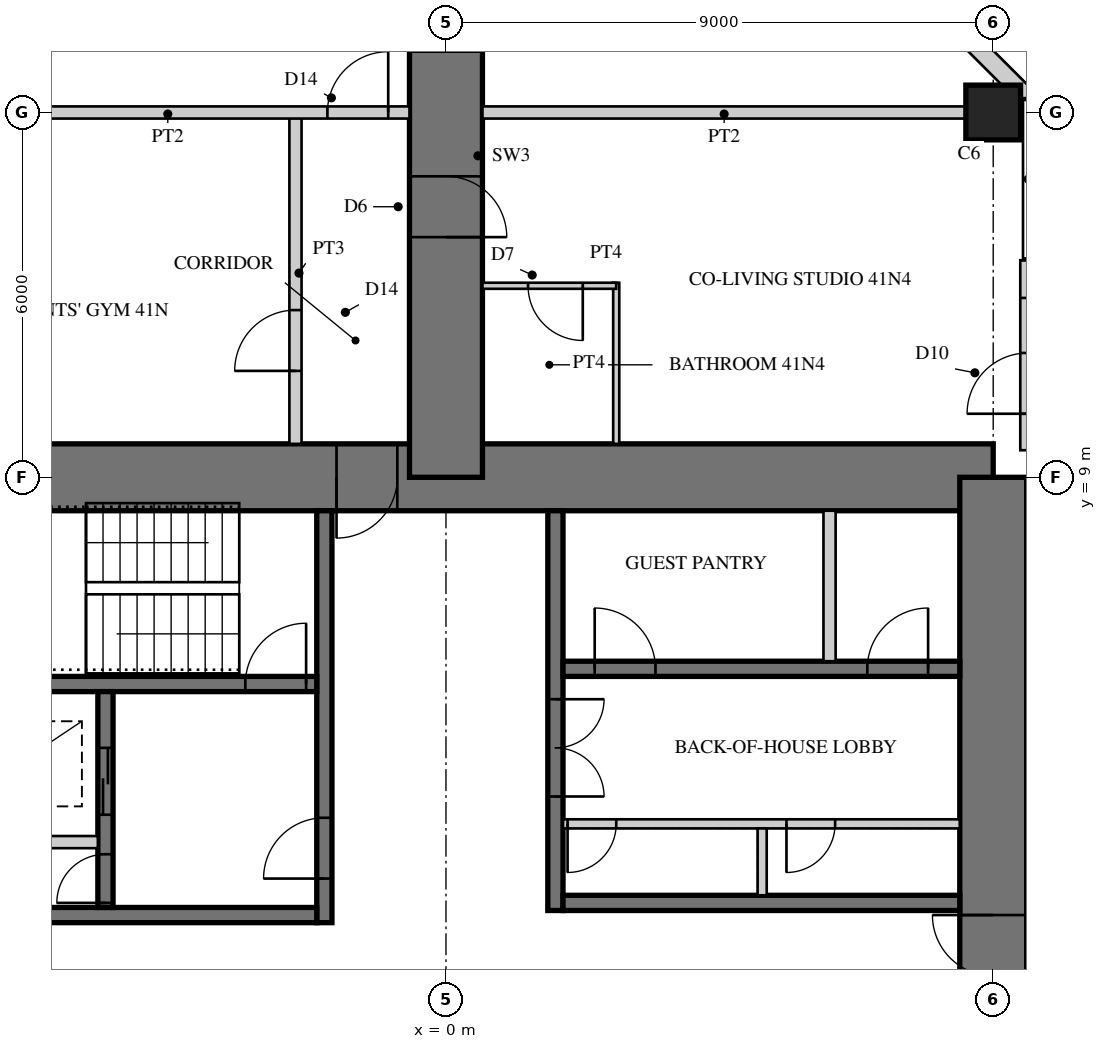
"""IFC4 building model, lengths in metres.
Left out: names, types, materials, properties, quantities, classifications, styles, units other than length and angle.
Written with IfcOpenShell. Run it as: python <this file> out.ifc"""

import sys

from ifc_helpers import new_model, si_unit, direction, frame, frame_2d, origin, origin_2d, place, context, subcontext, project, spatial, rectangle, hollow_rectangle, extrude, element, fill, save


model = new_model("IFC4")
c1 = context("Model", 3, precision=1e-05, world=origin(), true_north=direction((0.0, 1.0)))
c2 = subcontext(c1, "Body", "Model", "MODEL_VIEW")
j1 = project(units=[si_unit("LENGTHUNIT", "METRE"), si_unit("PLANEANGLEUNIT", "RADIAN")], contexts=[c1])
p1 = place(None, origin())
s1 = spatial("IfcSite", under=j1, at=p1, CompositionType="ELEMENT")
p2 = place(p1, origin())
s2 = spatial("IfcBuilding", under=s1, at=p2, CompositionType="ELEMENT")
p3 = place(p2, frame((0.0, 0.0, 169.5)))
s3 = spatial("IfcBuildingStorey", under=s2, at=p3, CompositionType="ELEMENT", Elevation=169.5)
p4 = place(p3, frame((9.0, 9.0, 0.0), z_axis=(0.0, 0.0, 1.0), x_axis=(-1.0, 0.0, 0.0)))
e1 = element("IfcWall", 1, at=p4, inside=s3, PredefinedType="SHEAR", context=c2, shape_type="SweptSolid", body=[
    extrude(rectangle(XDim=18.0, YDim=1.1, at=frame_2d((9.0, 0.0))), origin(), (0.0, 0.0, 1.0), 3.4),
])
p5 = place(p4, frame((9.8, 0.0, 0.0)))
e2 = element("IfcOpeningElement", 2, at=p5, cuts=e1, PredefinedType="OPENING", context=c2, shape_type="SweptSolid", body=[
    extrude(rectangle(XDim=1.0, YDim=2.4, at=frame_2d((0.5, 1.2))), frame((0.0, 0.56, 0.0), z_axis=(0.0, -1.0, 0.0), x_axis=(1.0, 0.0, 0.0)), (0.0, 0.0, 1.0), 1.12),
])
p6 = place(p3, frame((9.0, -9.0, 0.0), z_axis=(0.0, 0.0, 1.0), x_axis=(0.0, 1.0, 0.0)))
e3 = element("IfcWall", 3, at=p6, inside=s3, PredefinedType="SHEAR", context=c2, shape_type="SweptSolid", body=[
    extrude(rectangle(XDim=18.0, YDim=1.1, at=frame_2d((9.0, 0.0))), origin(), (0.0, 0.0, 1.0), 3.4),
])
p7 = place(p6, frame((9.8, 0.0, 0.0)))
e4 = element("IfcOpeningElement", 4, at=p7, cuts=e3, PredefinedType="OPENING", context=c2, shape_type="SweptSolid", body=[
    extrude(rectangle(XDim=1.0, YDim=2.4, at=frame_2d((0.5, 1.2))), frame((0.0, 0.56, 0.0), z_axis=(0.0, -1.0, 0.0), x_axis=(1.0, 0.0, 0.0)), (0.0, 0.0, 1.0), 1.12),
])
p8 = place(p3, frame((1.8, 1.875, 0.0), z_axis=(0.0, 0.0, 1.0), x_axis=(0.0, 1.0, 0.0)))
e5 = element("IfcWall", 5, at=p8, inside=s3, PredefinedType="SHEAR", context=c2, shape_type="SweptSolid", body=[
    extrude(rectangle(XDim=6.575, YDim=0.25, at=frame_2d((3.288, 0.0))), origin(), (0.0, 0.0, 1.0), 3.4),
])
p9 = place(p8, frame((1.875, 0.0, 0.0)))
e6 = element("IfcOpeningElement", 6, at=p9, cuts=e5, PredefinedType="OPENING", context=c2, shape_type="SweptSolid", body=[
    extrude(rectangle(XDim=1.6, YDim=2.4, at=frame_2d((0.8, 1.2))), frame((0.0, 0.135, 0.0), z_axis=(0.0, -1.0, 0.0), x_axis=(1.0, 0.0, 0.0)), (0.0, 0.0, 1.0), 0.27),
])
p10 = place(p3, frame((1.925, 2.0, 0.0), z_axis=(0.0, 0.0, 1.0), x_axis=(1.0, 0.0, 0.0)))
e7 = element("IfcWall", 7, at=p10, inside=s3, PredefinedType="SHEAR", context=c2, shape_type="SweptSolid", body=[
    extrude(rectangle(XDim=6.525, YDim=0.25, at=frame_2d((3.262, 0.0))), origin(), (0.0, 0.0, 1.0), 3.4),
])
p11 = place(p3, frame((1.925, 5.85, 0.0), z_axis=(0.0, 0.0, 1.0), x_axis=(1.0, 0.0, 0.0)))
e8 = element("IfcWall", 8, at=p11, inside=s3, PredefinedType="SHEAR", context=c2, shape_type="SweptSolid", body=[
    extrude(rectangle(XDim=6.525, YDim=0.25, at=frame_2d((3.262, 0.0))), origin(), (0.0, 0.0, 1.0), 3.4),
])
p12 = place(p11, frame((0.521, 0.0, 0.0)))
e9 = element("IfcOpeningElement", 9, at=p12, cuts=e8, PredefinedType="OPENING", context=c2, shape_type="SweptSolid", body=[
    extrude(rectangle(XDim=1.0, YDim=2.1, at=frame_2d((0.5, 1.05))), frame((0.0, 0.135, 0.0), z_axis=(0.0, -1.0, 0.0), x_axis=(1.0, 0.0, 0.0)), (0.0, 0.0, 1.0), 0.27),
])
p13 = place(p11, frame((5.004, 0.0, 0.0)))
e10 = element("IfcOpeningElement", 10, at=p13, cuts=e8, PredefinedType="OPENING", context=c2, shape_type="SweptSolid", body=[
    extrude(rectangle(XDim=1.0, YDim=2.1, at=frame_2d((0.5, 1.05))), frame((0.0, 0.135, 0.0), z_axis=(0.0, -1.0, 0.0), x_axis=(1.0, 0.0, 0.0)), (0.0, 0.0, 1.0), 0.27),
])
p14 = place(p3, frame((1.925, 3.3, 0.0), z_axis=(0.0, 0.0, 1.0), x_axis=(1.0, 0.0, 0.0)))
e11 = element("IfcWall", 11, at=p14, inside=s3, PredefinedType="PARTITIONING", context=c2, shape_type="SweptSolid", body=[
    extrude(rectangle(XDim=6.525, YDim=0.15, at=frame_2d((3.262, 0.0))), origin(), (0.0, 0.0, 1.0), 3.4),
])
p15 = place(p14, frame((0.075, 0.0, 0.0)))
e12 = element("IfcOpeningElement", 12, at=p15, cuts=e11, PredefinedType="OPENING", context=c2, shape_type="SweptSolid", body=[
    extrude(rectangle(XDim=0.8, YDim=2.1, at=frame_2d((0.4, 1.05))), frame((0.0, 0.085, 0.0), z_axis=(0.0, -1.0, 0.0), x_axis=(1.0, 0.0, 0.0)), (0.0, 0.0, 1.0), 0.17),
])
p16 = place(p14, frame((3.675, 0.0, 0.0)))
e13 = element("IfcOpeningElement", 13, at=p16, cuts=e11, PredefinedType="OPENING", context=c2, shape_type="SweptSolid", body=[
    extrude(rectangle(XDim=0.8, YDim=2.1, at=frame_2d((0.4, 1.05))), frame((0.0, 0.085, 0.0), z_axis=(0.0, -1.0, 0.0), x_axis=(1.0, 0.0, 0.0)), (0.0, 0.0, 1.0), 0.17),
])
p17 = place(p3, frame((5.2, 2.125, 0.0), z_axis=(0.0, 0.0, 1.0), x_axis=(0.0, 1.0, 0.0)))
e14 = element("IfcWall", 14, at=p17, inside=s3, PredefinedType="PARTITIONING", context=c2, shape_type="SweptSolid", body=[
    extrude(rectangle(XDim=1.1, YDim=0.15, at=frame_2d((0.55, 0.0))), origin(), (0.0, 0.0, 1.0), 3.4),
])
p18 = place(p3, frame((6.308, 5.975, 0.0), z_axis=(0.0, 0.0, 1.0), x_axis=(0.0, 1.0, 0.0)))
e15 = element("IfcWall", 15, at=p18, inside=s3, PredefinedType="PARTITIONING", context=c2, shape_type="SweptSolid", body=[
    extrude(rectangle(XDim=2.475, YDim=0.2, at=frame_2d((1.237, 0.0))), origin(), (0.0, 0.0, 1.0), 3.4),
])
p19 = place(p3, frame((-2.0, 1.675, 0.0), z_axis=(0.0, 0.0, 1.0), x_axis=(0.0, 1.0, 0.0)))
e16 = element("IfcWall", 16, at=p19, inside=s3, PredefinedType="SHEAR", context=c2, shape_type="SweptSolid", body=[
    extrude(rectangle(XDim=6.775, YDim=0.25, at=frame_2d((3.387, 0.0))), origin(), (0.0, 0.0, 1.0), 3.4),
])
p20 = place(p19, frame((0.725, 0.0, 0.0)))
e17 = element("IfcOpeningElement", 17, at=p20, cuts=e16, PredefinedType="OPENING", context=c2, shape_type="SweptSolid", body=[
    extrude(rectangle(XDim=1.0, YDim=2.1, at=frame_2d((0.5, 1.05))), frame((0.0, 0.135, 0.0), z_axis=(0.0, -1.0, 0.0), x_axis=(1.0, 0.0, 0.0)), (0.0, 0.0, 1.0), 0.27),
])
p21 = place(p3, frame((-2.125, 1.8, 0.0), z_axis=(0.0, 0.0, 1.0), x_axis=(-1.0, 0.0, 0.0)))
e18 = element("IfcWall", 18, at=p21, inside=s3, PredefinedType="SHEAR", context=c2, shape_type="SweptSolid", body=[
    extrude(rectangle(XDim=6.325, YDim=0.25, at=frame_2d((3.163, 0.0))), origin(), (0.0, 0.0, 1.0), 3.4),
])
p22 = place(p3, frame((-2.125, 5.6, 0.0), z_axis=(0.0, 0.0, 1.0), x_axis=(-1.0, 0.0, 0.0)))
e19 = element("IfcWall", 19, at=p22, inside=s3, PredefinedType="SHEAR", context=c2, shape_type="SweptSolid", body=[
    extrude(rectangle(XDim=6.325, YDim=0.25, at=frame_2d((3.163, 0.0))), origin(), (0.0, 0.0, 1.0), 3.4),
])
p23 = place(p22, frame((0.175, 0.0, 0.0)))
e20 = element("IfcOpeningElement", 20, at=p23, cuts=e19, PredefinedType="OPENING", context=c2, shape_type="SweptSolid", body=[
    extrude(rectangle(XDim=1.0, YDim=2.1, at=frame_2d((0.5, 1.05))), frame((0.0, 0.135, 0.0), z_axis=(0.0, -1.0, 0.0), x_axis=(1.0, 0.0, 0.0)), (0.0, 0.0, 1.0), 0.27),
])
p24 = place(p3, frame((-5.6, 1.925, 0.0), z_axis=(0.0, 0.0, 1.0), x_axis=(0.0, 1.0, 0.0)))
e21 = element("IfcWall", 21, at=p24, inside=s3, PredefinedType="SHEAR", context=c2, shape_type="SweptSolid", body=[
    extrude(rectangle(XDim=3.55, YDim=0.25, at=frame_2d((1.775, 0.0))), origin(), (0.0, 0.0, 1.0), 3.4),
])
p25 = place(p24, frame((1.525, 0.0, 0.0)))
e22 = element("IfcOpeningElement", 22, at=p25, cuts=e21, PredefinedType="OPENING", context=c2, shape_type="SweptSolid", body=[
    extrude(rectangle(XDim=1.1, YDim=2.2, at=frame_2d((0.55, 1.1))), frame((0.0, 0.135, 0.0), z_axis=(0.0, -1.0, 0.0), x_axis=(1.0, 0.0, 0.0)), (0.0, 0.0, 1.0), 0.27),
])
p26 = place(p24, frame((0.075, 0.0, 0.0)))
e23 = element("IfcOpeningElement", 23, at=p26, cuts=e21, PredefinedType="OPENING", context=c2, shape_type="SweptSolid", body=[
    extrude(rectangle(XDim=0.8, YDim=2.1, at=frame_2d((0.4, 1.05))), frame((0.0, 0.135, 0.0), z_axis=(0.0, -1.0, 0.0), x_axis=(1.0, 0.0, 0.0)), (0.0, 0.0, 1.0), 0.27),
])
p27 = place(p3, frame((-5.725, 3.0, 0.0), z_axis=(0.0, 0.0, 1.0), x_axis=(-1.0, 0.0, 0.0)))
e24 = element("IfcWall", 24, at=p27, inside=s3, PredefinedType="PARTITIONING", context=c2, shape_type="SweptSolid", body=[
    extrude(rectangle(XDim=2.725, YDim=0.2, at=frame_2d((1.362, 0.0))), origin(), (0.0, 0.0, 1.0), 3.4),
])
p28 = place(p3, frame((0.0, 9.0, 0.0), z_axis=(0.0, 0.0, 1.0), x_axis=(0.0, 1.0, 0.0)))
e25 = element("IfcWall", 25, at=p28, inside=s3, PredefinedType="SHEAR", context=c2, shape_type="SweptSolid", body=[
    extrude(rectangle(XDim=9.0, YDim=1.2, at=frame_2d((4.5, 0.0))), origin(), (0.0, 0.0, 1.0), 3.4),
])
p29 = place(p28, frame((3.95, 0.0, 0.0)))
e26 = element("IfcOpeningElement", 26, at=p29, cuts=e25, PredefinedType="OPENING", context=c2, shape_type="SweptSolid", body=[
    extrude(rectangle(XDim=1.0, YDim=2.15, at=frame_2d((0.5, 1.075))), frame((0.0, 0.61, 0.0), z_axis=(0.0, -1.0, 0.0), x_axis=(1.0, 0.0, 0.0)), (0.0, 0.0, 1.0), 1.22),
])
p30 = place(p28, frame((7.0, 0.0, 0.0)))
e27 = element("IfcOpeningElement", 27, at=p30, cuts=e25, PredefinedType="OPENING", context=c2, shape_type="SweptSolid", body=[
    extrude(rectangle(XDim=1.0, YDim=2.2, at=frame_2d((0.5, 1.1))), frame((0.0, 0.61, 0.0), z_axis=(0.0, -1.0, 0.0), x_axis=(1.0, 0.0, 0.0)), (0.0, 0.0, 1.0), 1.22),
])
p31 = place(p3, frame((9.0, 15.0, 0.0), z_axis=(0.0, 0.0, 1.0), x_axis=(1.0, 0.0, 0.0)))
e28 = element("IfcColumn", 28, at=p31, inside=s3, PredefinedType="COLUMN", context=c2, shape_type="SweptSolid", body=[
    extrude(rectangle(XDim=0.9, YDim=0.9, at=origin_2d()), origin(), (0.0, 0.0, 1.0), 3.4),
])
p32 = place(p3, frame((9.57, 9.445, 0.0), z_axis=(0.0, 0.0, 1.0), x_axis=(0.0, 1.0, 0.0)))
e29 = element("IfcWall", 29, at=p32, inside=s3, PredefinedType="SOLIDWALL", context=c2, shape_type="SweptSolid", body=[
    extrude(rectangle(XDim=3.125, YDim=0.25, at=frame_2d((1.562, 0.0))), origin(), (0.0, 0.0, 1.0), 3.22),
])
p33 = place(p32, frame((0.6, 0.0, 0.0)))
e30 = element("IfcOpeningElement", 30, at=p33, cuts=e29, PredefinedType="OPENING", context=c2, shape_type="SweptSolid", body=[
    extrude(rectangle(XDim=1.0, YDim=2.2, at=frame_2d((0.5, 1.1))), frame((0.0, 0.135, 0.0), z_axis=(0.0, -1.0, 0.0), x_axis=(1.0, 0.0, 0.0)), (0.0, 0.0, 1.0), 0.27),
])
p34 = place(p3, frame((9.57, 15.236, 0.0), z_axis=(0.0, 0.0, 1.0), x_axis=(-0.707106781187, 0.707106781187, 0.0)))
e31 = element("IfcWall", 31, at=p34, inside=s3, PredefinedType="SOLIDWALL", context=c2, shape_type="SweptSolid", body=[
    extrude(rectangle(XDim=4.757, YDim=0.3, at=frame_2d((2.379, 0.0))), origin(), (0.0, 0.0, 1.0), 3.22),
])
p35 = place(p34, frame((1.929, 0.0, 0.3)))
e32 = element("IfcOpeningElement", 32, at=p35, cuts=e31, PredefinedType="OPENING", context=c2, shape_type="SweptSolid", body=[
    extrude(rectangle(XDim=0.9, YDim=2.4, at=frame_2d((0.45, 1.2))), frame((0.0, 0.16, 0.0), z_axis=(0.0, -1.0, 0.0), x_axis=(1.0, 0.0, 0.0)), (0.0, 0.0, 1.0), 0.32),
])
p36 = place(p3, frame((-6.206, 18.6, 0.0), z_axis=(0.0, 0.0, 1.0), x_axis=(-0.707106781187, -0.707106781187, 0.0)))
e33 = element("IfcWall", 33, at=p36, inside=s3, PredefinedType="SOLIDWALL", context=c2, shape_type="SweptSolid", body=[
    extrude(rectangle(XDim=4.757, YDim=0.3, at=frame_2d((2.379, 0.0))), origin(), (0.0, 0.0, 1.0), 3.22),
])
p37 = place(p36, frame((1.929, 0.0, 0.3)))
e34 = element("IfcOpeningElement", 34, at=p37, cuts=e33, PredefinedType="OPENING", context=c2, shape_type="SweptSolid", body=[
    extrude(rectangle(XDim=0.9, YDim=2.4, at=frame_2d((0.45, 1.2))), frame((0.0, 0.16, 0.0), z_axis=(0.0, -1.0, 0.0), x_axis=(1.0, 0.0, 0.0)), (0.0, 0.0, 1.0), 0.32),
])
p38 = place(p3, frame((2.8, 9.55, 0.0), z_axis=(0.0, 0.0, 1.0), x_axis=(0.0, 1.0, 0.0)))
e35 = element("IfcWall", 35, at=p38, inside=s3, PredefinedType="PARTITIONING", context=c2, shape_type="SweptSolid", body=[
    extrude(rectangle(XDim=2.65, YDim=0.1, at=frame_2d((1.325, 0.0))), origin(), (0.0, 0.0, 1.0), 3.22),
])
p39 = place(p3, frame((2.8, 12.15, 0.0), z_axis=(0.0, 0.0, 1.0), x_axis=(-1.0, 0.0, 0.0)))
e36 = element("IfcWall", 36, at=p39, inside=s3, PredefinedType="PARTITIONING", context=c2, shape_type="SweptSolid", body=[
    extrude(rectangle(XDim=2.2, YDim=0.1, at=frame_2d((1.1, 0.0))), origin(), (0.0, 0.0, 1.0), 3.22),
])
p40 = place(p39, frame((0.55, 0.0, 0.0)))
e37 = element("IfcOpeningElement", 37, at=p40, cuts=e36, PredefinedType="OPENING", context=c2, shape_type="SweptSolid", body=[
    extrude(rectangle(XDim=0.9, YDim=2.1, at=frame_2d((0.45, 1.05))), frame((0.0, 0.06, 0.0), z_axis=(0.0, -1.0, 0.0), x_axis=(1.0, 0.0, 0.0)), (0.0, 0.0, 1.0), 0.12),
])
p41 = place(p3, frame((-2.475, 9.55, 0.0), z_axis=(0.0, 0.0, 1.0), x_axis=(0.0, 1.0, 0.0)))
e38 = element("IfcWall", 38, at=p41, inside=s3, PredefinedType="SOLIDWALL", context=c2, shape_type="SweptSolid", body=[
    extrude(rectangle(XDim=5.45, YDim=0.2, at=frame_2d((2.725, 0.0))), origin(), (0.0, 0.0, 1.0), 3.22),
])
p42 = place(p41, frame((1.2, 0.0, 0.0)))
e39 = element("IfcOpeningElement", 39, at=p42, cuts=e38, PredefinedType="OPENING", context=c2, shape_type="SweptSolid", body=[
    extrude(rectangle(XDim=1.0, YDim=2.2, at=frame_2d((0.5, 1.1))), frame((0.0, 0.11, 0.0), z_axis=(0.0, -1.0, 0.0), x_axis=(1.0, 0.0, 0.0)), (0.0, 0.0, 1.0), 0.22),
])
p43 = place(p3, frame((8.55, 15.0, 0.0), z_axis=(0.0, 0.0, 1.0), x_axis=(-1.0, 0.0, 0.0)))
e40 = element("IfcWall", 40, at=p43, inside=s3, PredefinedType="SOLIDWALL", context=c2, shape_type="SweptSolid", body=[
    extrude(rectangle(XDim=7.95, YDim=0.2, at=frame_2d((3.975, 0.0))), origin(), (0.0, 0.0, 1.0), 2.47),
])
p44 = place(p3, frame((-0.6, 15.0, 0.0), z_axis=(0.0, 0.0, 1.0), x_axis=(-1.0, 0.0, 0.0)))
e41 = element("IfcWall", 41, at=p44, inside=s3, PredefinedType="SOLIDWALL", context=c2, shape_type="SweptSolid", body=[
    extrude(rectangle(XDim=7.95, YDim=0.2, at=frame_2d((3.975, 0.0))), origin(), (0.0, 0.0, 1.0), 2.47),
])
p45 = place(p44, frame((0.35, 0.0, 0.0)))
e42 = element("IfcOpeningElement", 42, at=p45, cuts=e41, PredefinedType="OPENING", context=c2, shape_type="SweptSolid", body=[
    extrude(rectangle(XDim=1.0, YDim=2.2, at=frame_2d((0.5, 1.1))), frame((0.0, 0.11, 0.0), z_axis=(0.0, -1.0, 0.0), x_axis=(1.0, 0.0, 0.0)), (0.0, 0.0, 1.0), 0.22),
])
p46 = place(p33, origin())
e43 = element("IfcDoor", 43, at=p46, inside=s3, OperationType="SINGLE_SWING_LEFT", PredefinedType="DOOR", context=c2, shape_type="SweptSolid", body=[
    extrude(hollow_rectangle(XDim=1.0, YDim=2.2, WallThickness=0.06, at=frame_2d((0.5, 1.1))), frame((0.0, 0.025, 0.0), z_axis=(0.0, -1.0, 0.0), x_axis=(1.0, 0.0, 0.0)), (0.0, 0.0, 1.0), 0.05),
    extrude(rectangle(XDim=0.879, YDim=2.079, at=frame_2d((0.5, 1.1))), frame((0.0, 0.025, 0.0), z_axis=(0.0, -1.0, 0.0), x_axis=(1.0, 0.0, 0.0)), (0.0, 0.0, 1.0), 0.05),
])
fill(e30, e43)
p47 = place(p40, origin())
e44 = element("IfcDoor", 44, at=p47, inside=s3, OperationType="SINGLE_SWING_LEFT", PredefinedType="DOOR", context=c2, shape_type="SweptSolid", body=[
    extrude(rectangle(XDim=0.9, YDim=2.1, at=frame_2d((0.45, 1.05))), frame((0.0, 0.025, 0.0), z_axis=(0.0, -1.0, 0.0), x_axis=(1.0, 0.0, 0.0)), (0.0, 0.0, 1.0), 0.05),
])
fill(e37, e44)
p48 = place(p42, origin())
e45 = element("IfcDoor", 45, at=p48, inside=s3, OperationType="SINGLE_SWING_LEFT", PredefinedType="DOOR", context=c2, shape_type="SweptSolid", body=[
    extrude(rectangle(XDim=1.0, YDim=2.2, at=frame_2d((0.5, 1.1))), frame((0.0, 0.025, 0.0), z_axis=(0.0, -1.0, 0.0), x_axis=(1.0, 0.0, 0.0)), (0.0, 0.0, 1.0), 0.05),
])
fill(e39, e45)
p49 = place(p45, frame((1.0, 0.0, 0.0), z_axis=(0.0, 0.0, 1.0), x_axis=(-1.0, 0.0, 0.0)))
e46 = element("IfcDoor", 46, at=p49, inside=s3, OperationType="SINGLE_SWING_RIGHT", PredefinedType="DOOR", context=c2, shape_type="SweptSolid", body=[
    extrude(rectangle(XDim=1.0, YDim=2.2, at=frame_2d((0.5, 1.1))), frame((0.0, 0.025, 0.0), z_axis=(0.0, -1.0, 0.0), x_axis=(1.0, 0.0, 0.0)), (0.0, 0.0, 1.0), 0.05),
])
fill(e42, e46)
p50 = place(p29, frame((1.0, 0.0, 0.0), z_axis=(0.0, 0.0, 1.0), x_axis=(-1.0, 0.0, 0.0)))
e47 = element("IfcDoor", 47, at=p50, inside=s3, OperationType="SINGLE_SWING_RIGHT", PredefinedType="DOOR", context=c2, shape_type="SweptSolid", body=[
    extrude(rectangle(XDim=1.0, YDim=2.15, at=frame_2d((0.5, 1.075))), frame((0.0, 0.025, 0.0), z_axis=(0.0, -1.0, 0.0), x_axis=(1.0, 0.0, 0.0)), (0.0, 0.0, 1.0), 0.05),
])
fill(e26, e47)
p51 = place(p5, origin())
e48 = element("IfcDoor", 48, at=p51, inside=s3, OperationType="SINGLE_SWING_RIGHT", PredefinedType="DOOR", context=c2, shape_type="SweptSolid", body=[
    extrude(rectangle(XDim=1.0, YDim=2.4, at=frame_2d((0.5, 1.2))), frame((0.0, 0.055, 0.0), z_axis=(0.0, -1.0, 0.0), x_axis=(1.0, 0.0, 0.0)), (0.0, 0.0, 1.0), 0.05),
])
fill(e2, e48)
p52 = place(p7, origin())
e49 = element("IfcDoor", 49, at=p52, inside=s3, OperationType="SINGLE_SWING_RIGHT", PredefinedType="DOOR", context=c2, shape_type="SweptSolid", body=[
    extrude(rectangle(XDim=1.0, YDim=2.4, at=frame_2d((0.5, 1.2))), frame((0.0, 0.055, 0.0), z_axis=(0.0, -1.0, 0.0), x_axis=(1.0, 0.0, 0.0)), (0.0, 0.0, 1.0), 0.05),
])
fill(e4, e49)
p53 = place(p9, frame((1.6, 0.0, 0.0), z_axis=(0.0, 0.0, 1.0), x_axis=(-1.0, 0.0, 0.0)))
e50 = element("IfcDoor", 50, at=p53, inside=s3, OperationType="DOUBLE_DOOR_SINGLE_SWING", PredefinedType="DOOR", context=c2, shape_type="SweptSolid", body=[
    extrude(rectangle(XDim=1.6, YDim=2.4, at=frame_2d((0.8, 1.2))), frame((0.0, 0.025, 0.0), z_axis=(0.0, -1.0, 0.0), x_axis=(1.0, 0.0, 0.0)), (0.0, 0.0, 1.0), 0.05),
])
fill(e6, e50)
p54 = place(p15, frame((0.8, 0.0, 0.0), z_axis=(0.0, 0.0, 1.0), x_axis=(-1.0, 0.0, 0.0)))
e51 = element("IfcDoor", 51, at=p54, inside=s3, OperationType="SINGLE_SWING_RIGHT", PredefinedType="DOOR", context=c2, shape_type="SweptSolid", body=[
    extrude(rectangle(XDim=0.8, YDim=2.1, at=frame_2d((0.4, 1.05))), frame((0.0, 0.025, 0.0), z_axis=(0.0, -1.0, 0.0), x_axis=(1.0, 0.0, 0.0)), (0.0, 0.0, 1.0), 0.05),
])
fill(e12, e51)
p55 = place(p16, frame((0.8, 0.0, 0.0), z_axis=(0.0, 0.0, 1.0), x_axis=(-1.0, 0.0, 0.0)))
e52 = element("IfcDoor", 52, at=p55, inside=s3, OperationType="SINGLE_SWING_RIGHT", PredefinedType="DOOR", context=c2, shape_type="SweptSolid", body=[
    extrude(rectangle(XDim=0.8, YDim=2.1, at=frame_2d((0.4, 1.05))), frame((0.0, 0.025, 0.0), z_axis=(0.0, -1.0, 0.0), x_axis=(1.0, 0.0, 0.0)), (0.0, 0.0, 1.0), 0.05),
])
fill(e13, e52)
p56 = place(p20, origin())
e53 = element("IfcDoor", 53, at=p56, inside=s3, OperationType="SINGLE_SWING_LEFT", PredefinedType="DOOR", context=c2, shape_type="SweptSolid", body=[
    extrude(rectangle(XDim=1.0, YDim=2.1, at=frame_2d((0.5, 1.05))), frame((0.0, 0.025, 0.0), z_axis=(0.0, -1.0, 0.0), x_axis=(1.0, 0.0, 0.0)), (0.0, 0.0, 1.0), 0.05),
])
fill(e17, e53)
p57 = place(p23, frame((1.0, 0.0, 0.0), z_axis=(0.0, 0.0, 1.0), x_axis=(-1.0, 0.0, 0.0)))
e54 = element("IfcDoor", 54, at=p57, inside=s3, OperationType="SINGLE_SWING_RIGHT", PredefinedType="DOOR", context=c2, shape_type="SweptSolid", body=[
    extrude(rectangle(XDim=1.0, YDim=2.1, at=frame_2d((0.5, 1.05))), frame((0.0, 0.025, 0.0), z_axis=(0.0, -1.0, 0.0), x_axis=(1.0, 0.0, 0.0)), (0.0, 0.0, 1.0), 0.05),
])
fill(e20, e54)
p58 = place(p25, origin())
e55 = element("IfcDoor", 55, at=p58, inside=s3, OperationType="DOUBLE_DOOR_SLIDING", PredefinedType="DOOR", context=c2, shape_type="SweptSolid", body=[
    extrude(rectangle(XDim=1.1, YDim=2.2, at=frame_2d((0.55, 1.1))), frame((0.0, 0.025, 0.0), z_axis=(0.0, -1.0, 0.0), x_axis=(1.0, 0.0, 0.0)), (0.0, 0.0, 1.0), 0.05),
])
fill(e22, e55)
p59 = place(p26, origin())
e56 = element("IfcDoor", 56, at=p59, inside=s3, OperationType="SINGLE_SWING_LEFT", PredefinedType="DOOR", context=c2, shape_type="SweptSolid", body=[
    extrude(rectangle(XDim=0.8, YDim=2.1, at=frame_2d((0.4, 1.05))), frame((0.0, 0.025, 0.0), z_axis=(0.0, -1.0, 0.0), x_axis=(1.0, 0.0, 0.0)), (0.0, 0.0, 1.0), 0.05),
])
fill(e23, e56)
p60 = place(p12, origin())
e57 = element("IfcDoor", 57, at=p60, inside=s3, OperationType="SINGLE_SWING_LEFT", PredefinedType="DOOR", context=c2, shape_type="SweptSolid", body=[
    extrude(rectangle(XDim=1.0, YDim=2.1, at=frame_2d((0.5, 1.05))), frame((0.0, 0.025, 0.0), z_axis=(0.0, -1.0, 0.0), x_axis=(1.0, 0.0, 0.0)), (0.0, 0.0, 1.0), 0.05),
])
fill(e9, e57)
p61 = place(p13, origin())
e58 = element("IfcDoor", 58, at=p61, inside=s3, OperationType="SINGLE_SWING_RIGHT", PredefinedType="DOOR", context=c2, shape_type="SweptSolid", body=[
    extrude(rectangle(XDim=1.0, YDim=2.1, at=frame_2d((0.5, 1.05))), frame((0.0, 0.025, 0.0), z_axis=(0.0, -1.0, 0.0), x_axis=(1.0, 0.0, 0.0)), (0.0, 0.0, 1.0), 0.05),
])
fill(e10, e58)
save(model, sys.argv[1])
